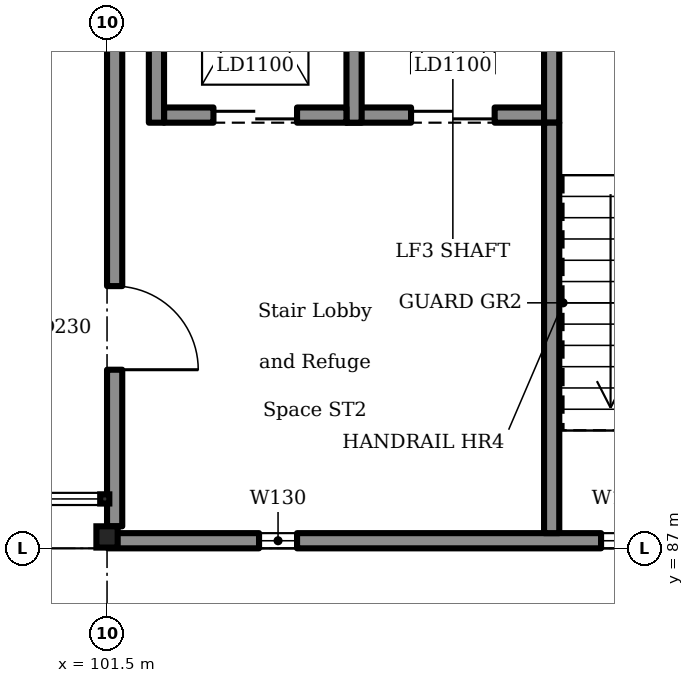
"""IFC4 building model, lengths in metres.
Left out: names, types, materials, properties, quantities, classifications, styles, units other than length and angle.
Written with IfcOpenShell. Run it as: python <this file> out.ifc"""

import sys

from ifc_helpers import new_model, si_unit, direction, frame, frame_2d, origin, origin_2d, place, context, subcontext, project, spatial, rectangle, i_section, extrude, element, fill, save


model = new_model("IFC4")
c1 = context("Model", 3, precision=1e-05, world=origin(), true_north=direction((0.0, 1.0)))
c2 = subcontext(c1, "Body", "Model", "MODEL_VIEW")
j1 = project(units=[si_unit("LENGTHUNIT", "METRE"), si_unit("PLANEANGLEUNIT", "RADIAN")], contexts=[c1])
p1 = place(None, origin())
s1 = spatial("IfcSite", under=j1, at=p1, CompositionType="ELEMENT")
p2 = place(p1, origin())
s2 = spatial("IfcBuilding", under=s1, at=p2, CompositionType="ELEMENT")
p3 = place(p2, frame((0.0, 0.0, 18.9)))
s3 = spatial("IfcBuildingStorey", under=s2, at=p3, CompositionType="ELEMENT", Elevation=18.9)
p4 = place(p3, frame((104.65, 92.7, 0.0), z_axis=(0.0, 0.0, 1.0), x_axis=(1.0, 0.0, 0.0)))
e1 = element("IfcWall", 1, at=p4, inside=s3, PredefinedType="SOLIDWALL", context=c2, shape_type="SweptSolid", body=[
    extrude(rectangle(XDim=2.6, YDim=0.2, at=frame_2d((1.3, 0.0))), origin(), (0.0, 0.0, 1.0), 4.5),
])
p5 = place(p4, frame((0.85, 0.0, 0.0)))
e2 = element("IfcOpeningElement", 2, at=p5, cuts=e1, PredefinedType="OPENING", context=c2, shape_type="SweptSolid", body=[
    extrude(rectangle(XDim=1.1, YDim=2.1, at=frame_2d((0.55, 1.05))), frame((0.0, 0.11, 0.0), z_axis=(0.0, -1.0, 0.0), x_axis=(1.0, 0.0, 0.0)), (0.0, 0.0, 1.0), 0.22),
])
for number, where, z_axis, x_axis in (
    (3, (104.75, 92.6, 0.0), (0.0, 0.0, 1.0), (0.0, 1.0, 0.0)),
    (4, (107.35, 92.6, 0.0), (0.0, 0.0, 1.0), (0.0, 1.0, 0.0)),
):
    element("IfcWall", number, at=place(p3, frame(where, z_axis=z_axis, x_axis=x_axis)), inside=s3, PredefinedType="SOLIDWALL", context=c2, shape_type="SweptSolid", body=[
        extrude(rectangle(XDim=3.4, YDim=0.2, at=frame_2d((1.7, 0.0))), origin(), (0.0, 0.0, 1.0), 4.5),
    ])
p6 = place(p3, frame((102.25, 92.7, 0.0), z_axis=(0.0, 0.0, 1.0), x_axis=(1.0, 0.0, 0.0)))
e5 = element("IfcWall", 5, at=p6, inside=s3, PredefinedType="SOLIDWALL", context=c2, shape_type="SweptSolid", body=[
    extrude(rectangle(XDim=2.4, YDim=0.2, at=frame_2d((1.2, 0.0))), origin(), (0.0, 0.0, 1.0), 4.5),
])
p7 = place(p6, frame((0.65, 0.0, 0.0)))
e6 = element("IfcOpeningElement", 6, at=p7, cuts=e5, PredefinedType="OPENING", context=c2, shape_type="SweptSolid", body=[
    extrude(rectangle(XDim=1.1, YDim=2.1, at=frame_2d((0.55, 1.05))), frame((0.0, 0.11, 0.0), z_axis=(0.0, -1.0, 0.0), x_axis=(1.0, 0.0, 0.0)), (0.0, 0.0, 1.0), 0.22),
])
p8 = place(p3, frame((102.15, 92.6, 0.0), z_axis=(0.0, 0.0, 1.0), x_axis=(0.0, 1.0, 0.0)))
e7 = element("IfcWall", 7, at=p8, inside=s3, PredefinedType="SOLIDWALL", context=c2, shape_type="SweptSolid", body=[
    extrude(rectangle(XDim=3.4, YDim=0.2, at=frame_2d((1.7, 0.0))), origin(), (0.0, 0.0, 1.0), 4.5),
])
p9 = place(p3, frame((101.5, 87.15, 0.0), z_axis=(0.0, 0.0, 1.0), x_axis=(1.0, 0.0, 0.0)))
e8 = element("IfcColumn", 8, at=p9, inside=s3, PredefinedType="COLUMN", context=c2, shape_type="SweptSolid", body=[
    extrude(i_section(OverallWidth=0.28, OverallDepth=0.28, WebThickness=0.01, FlangeThickness=0.018, FilletRadius=0.024, at=origin_2d()), origin(), (0.0, 0.0, 1.0), 4.5),
])
p10 = place(p3, frame((101.6, 87.29, 0.0), z_axis=(0.0, 0.0, 1.0), x_axis=(0.0, 1.0, 0.0)))
e9 = element("IfcWall", 9, at=p10, inside=s3, PredefinedType="SOLIDWALL", context=c2, shape_type="SweptSolid", body=[
    extrude(rectangle(XDim=8.57, YDim=0.2, at=frame_2d((4.285, 0.0))), origin(), (0.0, 0.0, 1.0), 4.35),
])
p11 = place(p10, frame((2.06, 0.0, 0.0)))
e10 = element("IfcOpeningElement", 10, at=p11, cuts=e9, PredefinedType="OPENING", context=c2, shape_type="SweptSolid", body=[
    extrude(rectangle(XDim=1.1, YDim=2.1, at=frame_2d((0.55, 1.05))), frame((0.0, 0.11, 0.0), z_axis=(0.0, -1.0, 0.0), x_axis=(1.0, 0.0, 0.0)), (0.0, 0.0, 1.0), 0.22),
])
p12 = place(p3, frame((101.511, 87.1, 0.0), z_axis=(0.0, 0.0, 1.0), x_axis=(1.0, 0.0, 0.0)))
e11 = element("IfcWall", 11, at=p12, inside=s3, PredefinedType="SOLIDWALL", context=c2, shape_type="SweptSolid", body=[
    extrude(rectangle(XDim=8.978, YDim=0.2, at=frame_2d((4.489, 0.0))), origin(), (0.0, 0.0, 1.0), 4.35),
])
p13 = place(p12, frame((1.989, 0.0, 2.9)))
e12 = element("IfcOpeningElement", 12, at=p13, cuts=e11, PredefinedType="OPENING", context=c2, shape_type="SweptSolid", body=[
    extrude(rectangle(XDim=0.5, YDim=1.2, at=frame_2d((0.25, 0.6))), frame((0.0, 0.11, 0.0), z_axis=(0.0, -1.0, 0.0), x_axis=(1.0, 0.0, 0.0)), (0.0, 0.0, 1.0), 0.22),
])
p14 = place(p12, frame((6.489, 0.0, 2.9)))
e13 = element("IfcOpeningElement", 13, at=p14, cuts=e11, PredefinedType="OPENING", context=c2, shape_type="SweptSolid", body=[
    extrude(rectangle(XDim=0.5, YDim=1.2, at=frame_2d((0.25, 0.6))), frame((0.0, 0.11, 0.0), z_axis=(0.0, -1.0, 0.0), x_axis=(1.0, 0.0, 0.0)), (0.0, 0.0, 1.0), 0.22),
])
p15 = place(p3, frame((107.35, 87.2, 0.0), z_axis=(0.0, 0.0, 1.0), x_axis=(0.0, 1.0, 0.0)))
e14 = element("IfcWall", 14, at=p15, inside=s3, PredefinedType="SOLIDWALL", context=c2, shape_type="SweptSolid", body=[
    extrude(rectangle(XDim=5.4, YDim=0.2, at=frame_2d((2.7, 0.0))), origin(), (0.0, 0.0, 1.0), 4.35),
])
p16 = place(p5, origin())
e15 = element("IfcDoor", 15, at=p16, inside=s3, OperationType="SLIDING_TO_LEFT", PredefinedType="DOOR", context=c2, shape_type="SweptSolid", body=[
    extrude(rectangle(XDim=1.1, YDim=2.1, at=frame_2d((0.55, 1.05))), frame((0.0, 0.025, 0.0), z_axis=(0.0, -1.0, 0.0), x_axis=(1.0, 0.0, 0.0)), (0.0, 0.0, 1.0), 0.05),
])
fill(e2, e15)
p17 = place(p7, origin())
e16 = element("IfcDoor", 16, at=p17, inside=s3, OperationType="SLIDING_TO_LEFT", PredefinedType="DOOR", context=c2, shape_type="SweptSolid", body=[
    extrude(rectangle(XDim=1.1, YDim=2.1, at=frame_2d((0.55, 1.05))), frame((0.0, 0.025, 0.0), z_axis=(0.0, -1.0, 0.0), x_axis=(1.0, 0.0, 0.0)), (0.0, 0.0, 1.0), 0.05),
])
fill(e6, e16)
p18 = place(p13, origin())
e17 = element("IfcWindow", 17, at=p18, inside=s3, PartitioningType="SINGLE_PANEL", PredefinedType="WINDOW", context=c2, shape_type="SweptSolid", body=[
    extrude(rectangle(XDim=0.5, YDim=1.2, at=frame_2d((0.25, 0.6))), frame((0.0, 0.03, 0.0), z_axis=(0.0, -1.0, 0.0), x_axis=(1.0, 0.0, 0.0)), (0.0, 0.0, 1.0), 0.06),
])
fill(e12, e17)
p19 = place(p14, origin())
e18 = element("IfcWindow", 18, at=p19, inside=s3, PartitioningType="SINGLE_PANEL", PredefinedType="WINDOW", context=c2, shape_type="SweptSolid", body=[
    extrude(rectangle(XDim=0.5, YDim=1.2, at=frame_2d((0.25, 0.6))), frame((0.0, 0.03, 0.0), z_axis=(0.0, -1.0, 0.0), x_axis=(1.0, 0.0, 0.0)), (0.0, 0.0, 1.0), 0.06),
])
fill(e13, e18)
p20 = place(p11, frame((1.1, 0.0, 0.0), z_axis=(0.0, 0.0, 1.0), x_axis=(-1.0, 0.0, 0.0)))
e19 = element("IfcDoor", 19, at=p20, inside=s3, OperationType="SINGLE_SWING_LEFT", PredefinedType="DOOR", context=c2, shape_type="SweptSolid", body=[
    extrude(rectangle(XDim=1.1, YDim=2.1, at=frame_2d((0.55, 1.05))), frame((0.0, 0.025, 0.0), z_axis=(0.0, -1.0, 0.0), x_axis=(1.0, 0.0, 0.0)), (0.0, 0.0, 1.0), 0.05),
])
fill(e10, e19)
save(model, sys.argv[1])
